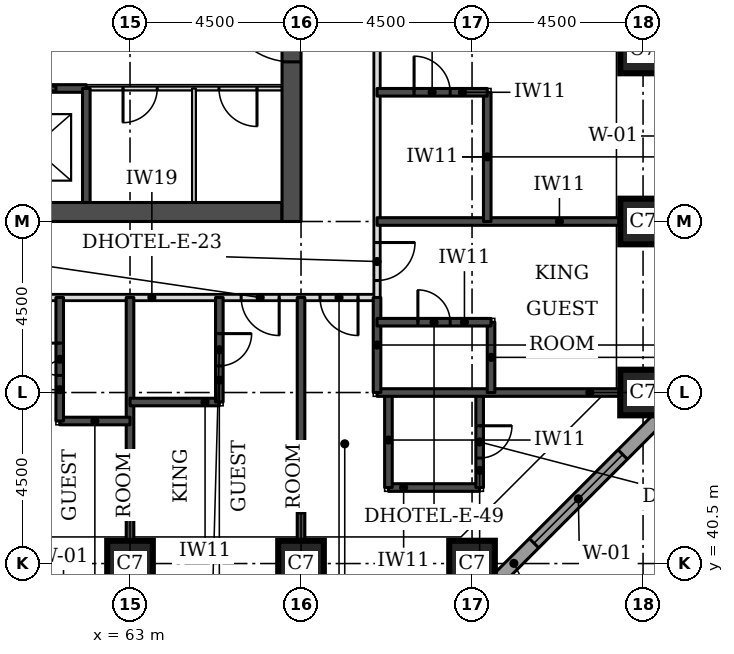
"""IFC4 building model, lengths in metres.
Left out: names, types, materials, properties, quantities, classifications, styles, units other than length and angle.
Written with IfcOpenShell. Run it as: python <this file> out.ifc"""

import sys

from ifc_helpers import new_model, si_unit, direction, frame, frame_2d, origin, origin_2d, place, context, subcontext, project, spatial, rectangle, extrude, element, fill, save


model = new_model("IFC4")
c1 = context("Model", 3, precision=1e-05, world=origin(), true_north=direction((0.0, 1.0)))
c2 = subcontext(c1, "Body", "Model", "MODEL_VIEW")
j1 = project(units=[si_unit("LENGTHUNIT", "METRE"), si_unit("PLANEANGLEUNIT", "RADIAN")], contexts=[c1])
p1 = place(None, origin())
s1 = spatial("IfcSite", under=j1, at=p1, CompositionType="ELEMENT")
p2 = place(p1, origin())
s2 = spatial("IfcBuilding", under=s1, at=p2, CompositionType="ELEMENT")
p3 = place(p2, frame((0.0, 0.0, 62.7)))
s3 = spatial("IfcBuildingStorey", under=s2, at=p3, CompositionType="ELEMENT", Elevation=62.7)
for number, where, z_axis, x_axis in (
    (1, (63.0, 40.5, 0.0), (0.0, 0.0, 1.0), (1.0, 0.0, 0.0)),
    (2, (67.5, 40.5, 0.0), (0.0, 0.0, 1.0), (1.0, 0.0, 0.0)),
    (3, (72.0, 40.5, 0.0), (0.0, 0.0, 1.0), (1.0, 0.0, 0.0)),
    (4, (76.5, 45.0, 0.0), (0.0, 0.0, 1.0), (1.0, 0.0, 0.0)),
    (5, (76.5, 49.5, 0.0), (0.0, 0.0, 1.0), (1.0, 0.0, 0.0)),
    (6, (76.5, 54.0, 0.0), (0.0, 0.0, 1.0), (1.0, 0.0, 0.0)),
):
    element("IfcColumn", number, at=place(p3, frame(where, z_axis=z_axis, x_axis=x_axis)), inside=s3, PredefinedType="COLUMN", context=c2, shape_type="SweptSolid", body=[
        extrude(rectangle(XDim=1.2, YDim=1.2, at=origin_2d()), origin(), (0.0, 0.0, 1.0), 3.3),
    ])
p4 = place(p3, frame((45.5, 49.75, 0.0), z_axis=(0.0, 0.0, 1.0), x_axis=(1.0, 0.0, 0.0)))
e7 = element("IfcWall", 7, at=p4, inside=s3, PredefinedType="SHEAR", context=c2, shape_type="SweptSolid", body=[
    extrude(rectangle(XDim=21.5, YDim=0.5, at=frame_2d((10.75, 0.0))), origin(), (0.0, 0.0, 1.0), 3.3),
])
p5 = place(p3, frame((67.25, 49.5, 0.0), z_axis=(0.0, 0.0, 1.0), x_axis=(0.0, 1.0, 0.0)))
e8 = element("IfcWall", 8, at=p5, inside=s3, PredefinedType="SHEAR", context=c2, shape_type="SweptSolid", body=[
    extrude(rectangle(XDim=22.5, YDim=0.5, at=frame_2d((11.25, 0.0))), origin(), (0.0, 0.0, 1.0), 3.3),
])
p6 = place(p5, frame((4.2, 0.0, 0.0)))
e9 = element("IfcOpeningElement", 9, at=p6, cuts=e8, PredefinedType="OPENING", context=c2, shape_type="SweptSolid", body=[
    extrude(rectangle(XDim=1.8, YDim=2.1, at=frame_2d((0.9, 1.05))), frame((0.0, 0.26, 0.0), z_axis=(0.0, -1.0, 0.0), x_axis=(1.0, 0.0, 0.0)), (0.0, 0.0, 1.0), 0.52),
])
p7 = place(p5, frame((6.9, 0.0, 0.0)))
e10 = element("IfcOpeningElement", 10, at=p7, cuts=e8, PredefinedType="OPENING", context=c2, shape_type="SweptSolid", body=[
    extrude(rectangle(XDim=1.1, YDim=2.1, at=frame_2d((0.55, 1.05))), frame((0.0, 0.26, 0.0), z_axis=(0.0, -1.0, 0.0), x_axis=(1.0, 0.0, 0.0)), (0.0, 0.0, 1.0), 0.52),
])
p8 = place(p5, frame((13.6, 0.0, 0.0)))
e11 = element("IfcOpeningElement", 11, at=p8, cuts=e8, PredefinedType="OPENING", context=c2, shape_type="SweptSolid", body=[
    extrude(rectangle(XDim=1.1, YDim=2.1, at=frame_2d((0.55, 1.05))), frame((0.0, 0.26, 0.0), z_axis=(0.0, -1.0, 0.0), x_axis=(1.0, 0.0, 0.0)), (0.0, 0.0, 1.0), 0.52),
])
p9 = place(p5, frame((16.5, 0.0, 0.0)))
e12 = element("IfcOpeningElement", 12, at=p9, cuts=e8, PredefinedType="OPENING", context=c2, shape_type="SweptSolid", body=[
    extrude(rectangle(XDim=1.8, YDim=2.1, at=frame_2d((0.9, 1.05))), frame((0.0, 0.26, 0.0), z_axis=(0.0, -1.0, 0.0), x_axis=(1.0, 0.0, 0.0)), (0.0, 0.0, 1.0), 0.52),
])
p10 = place(p3, frame((72.27, 39.674, 0.0), z_axis=(0.0, 0.0, 1.0), x_axis=(0.707106781187, 0.707106781187, 0.0)))
e13 = element("IfcWall", 13, at=p10, inside=s3, PredefinedType="STANDARD", context=c2, shape_type="SweptSolid", body=[
    extrude(rectangle(XDim=7.151, YDim=0.35, at=frame_2d((3.576, 0.0))), origin(), (0.0, 0.0, 1.0), 3.055),
])
p11 = place(p10, frame((1.926, 0.0, 0.8)))
e14 = element("IfcOpeningElement", 14, at=p11, cuts=e13, PredefinedType="OPENING", context=c2, shape_type="SweptSolid", body=[
    extrude(rectangle(XDim=3.3, YDim=1.5, at=frame_2d((1.65, 0.75))), frame((0.0, 0.185, 0.0), z_axis=(0.0, -1.0, 0.0), x_axis=(1.0, 0.0, 0.0)), (0.0, 0.0, 1.0), 0.37),
])
p12 = place(p3, frame((52.85, 47.5, 0.0), z_axis=(0.0, 0.0, 1.0), x_axis=(1.0, 0.0, 0.0)))
e15 = element("IfcWall", 15, at=p12, inside=s3, PredefinedType="PARTITIONING", context=c2, shape_type="SweptSolid", body=[
    extrude(rectangle(XDim=16.65, YDim=0.15, at=frame_2d((8.325, 0.0))), origin(), (0.0, 0.0, 1.0), 3.08),
])
p13 = place(p12, frame((13.075, 0.0, 0.0)))
e16 = element("IfcOpeningElement", 16, at=p13, cuts=e15, PredefinedType="OPENING", context=c2, shape_type="SweptSolid", body=[
    extrude(rectangle(XDim=1.0, YDim=2.1, at=frame_2d((0.5, 1.05))), frame((0.0, 0.085, 0.0), z_axis=(0.0, -1.0, 0.0), x_axis=(1.0, 0.0, 0.0)), (0.0, 0.0, 1.0), 0.17),
])
p14 = place(p12, frame((6.475, 0.0, 0.0)))
e17 = element("IfcOpeningElement", 17, at=p14, cuts=e15, PredefinedType="OPENING", context=c2, shape_type="SweptSolid", body=[
    extrude(rectangle(XDim=1.0, YDim=2.1, at=frame_2d((0.5, 1.05))), frame((0.0, 0.085, 0.0), z_axis=(0.0, -1.0, 0.0), x_axis=(1.0, 0.0, 0.0)), (0.0, 0.0, 1.0), 0.17),
])
p15 = place(p12, frame((15.15, 0.0, 0.0)))
e18 = element("IfcOpeningElement", 18, at=p15, cuts=e15, PredefinedType="OPENING", context=c2, shape_type="SweptSolid", body=[
    extrude(rectangle(XDim=1.0, YDim=2.1, at=frame_2d((0.5, 1.05))), frame((0.0, 0.085, 0.0), z_axis=(0.0, -1.0, 0.0), x_axis=(1.0, 0.0, 0.0)), (0.0, 0.0, 1.0), 0.17),
])
p16 = place(p3, frame((69.5, 47.5, 0.0), z_axis=(0.0, 0.0, 1.0), x_axis=(0.0, 1.0, 0.0)))
e19 = element("IfcWall", 19, at=p16, inside=s3, PredefinedType="PARTITIONING", context=c2, shape_type="SweptSolid", body=[
    extrude(rectangle(XDim=26.5, YDim=0.15, at=frame_2d((13.25, 0.0))), origin(), (0.0, 0.0, 1.0), 3.08),
])
p17 = place(p16, frame((25.053, 0.0, 0.0)))
e20 = element("IfcOpeningElement", 20, at=p17, cuts=e19, PredefinedType="OPENING", context=c2, shape_type="SweptSolid", body=[
    extrude(rectangle(XDim=1.0, YDim=2.1, at=frame_2d((0.5, 1.05))), frame((0.0, 0.085, 0.0), z_axis=(0.0, -1.0, 0.0), x_axis=(1.0, 0.0, 0.0)), (0.0, 0.0, 1.0), 0.17),
])
p18 = place(p16, frame((13.775, 0.0, 0.0)))
e21 = element("IfcOpeningElement", 21, at=p18, cuts=e19, PredefinedType="OPENING", context=c2, shape_type="SweptSolid", body=[
    extrude(rectangle(XDim=1.0, YDim=2.1, at=frame_2d((0.5, 1.05))), frame((0.0, 0.085, 0.0), z_axis=(0.0, -1.0, 0.0), x_axis=(1.0, 0.0, 0.0)), (0.0, 0.0, 1.0), 0.17),
])
p19 = place(p16, frame((7.65, 0.0, 0.0)))
e22 = element("IfcOpeningElement", 22, at=p19, cuts=e19, PredefinedType="OPENING", context=c2, shape_type="SweptSolid", body=[
    extrude(rectangle(XDim=1.1, YDim=2.1, at=frame_2d((0.55, 1.05))), frame((0.0, 0.085, 0.0), z_axis=(0.0, -1.0, 0.0), x_axis=(1.0, 0.0, 0.0)), (0.0, 0.0, 1.0), 0.17),
])
p20 = place(p16, frame((0.447, 0.0, 0.0)))
e23 = element("IfcOpeningElement", 23, at=p20, cuts=e19, PredefinedType="OPENING", context=c2, shape_type="SweptSolid", body=[
    extrude(rectangle(XDim=1.0, YDim=2.1, at=frame_2d((0.5, 1.05))), frame((0.0, 0.085, 0.0), z_axis=(0.0, -1.0, 0.0), x_axis=(1.0, 0.0, 0.0)), (0.0, 0.0, 1.0), 0.17),
])
for number, where, z_axis, x_axis in (
    (24, (63.0, 41.1, 0.0), (0.0, 0.0, 1.0), (0.0, 1.0, 0.0)),
    (25, (67.5, 41.1, 0.0), (0.0, 0.0, 1.0), (0.0, 1.0, 0.0)),
):
    element("IfcWall", number, at=place(p3, frame(where, z_axis=z_axis, x_axis=x_axis)), inside=s3, PredefinedType="SOLIDWALL", context=c2, shape_type="SweptSolid", body=[
        extrude(rectangle(XDim=6.4, YDim=0.2, at=frame_2d((3.2, 0.0))), origin(), (0.0, 0.0, 1.0), 3.08),
    ])
p21 = place(p3, frame((69.8, 42.5, 0.0), z_axis=(0.0, 0.0, 1.0), x_axis=(1.0, 0.0, 0.0)))
e26 = element("IfcWall", 26, at=p21, inside=s3, PredefinedType="SOLIDWALL", context=c2, shape_type="SweptSolid", body=[
    extrude(rectangle(XDim=2.4, YDim=0.2, at=frame_2d((1.2, 0.0))), origin(), (0.0, 0.0, 1.0), 3.08),
])
p22 = place(p3, frame((69.8, 42.5, 0.0), z_axis=(0.0, 0.0, 1.0), x_axis=(0.0, 1.0, 0.0)))
e27 = element("IfcWall", 27, at=p22, inside=s3, PredefinedType="SOLIDWALL", context=c2, shape_type="SweptSolid", body=[
    extrude(rectangle(XDim=2.5, YDim=0.2, at=frame_2d((1.25, 0.0))), origin(), (0.0, 0.0, 1.0), 3.08),
])
p23 = place(p3, frame((72.2, 42.5, 0.0), z_axis=(0.0, 0.0, 1.0), x_axis=(0.0, 1.0, 0.0)))
e28 = element("IfcWall", 28, at=p23, inside=s3, PredefinedType="SOLIDWALL", context=c2, shape_type="SweptSolid", body=[
    extrude(rectangle(XDim=2.5, YDim=0.2, at=frame_2d((1.25, 0.0))), origin(), (0.0, 0.0, 1.0), 3.08),
])
p24 = place(p23, frame((0.775, 0.0, 0.0)))
e29 = element("IfcOpeningElement", 29, at=p24, cuts=e28, PredefinedType="OPENING", context=c2, shape_type="SweptSolid", body=[
    extrude(rectangle(XDim=0.85, YDim=2.1, at=frame_2d((0.425, 1.05))), frame((0.0, 0.11, 0.0), z_axis=(0.0, -1.0, 0.0), x_axis=(1.0, 0.0, 0.0)), (0.0, 0.0, 1.0), 0.22),
])
p25 = place(p3, frame((61.15, 44.25, 0.0), z_axis=(0.0, 0.0, 1.0), x_axis=(1.0, 0.0, 0.0)))
e30 = element("IfcWall", 30, at=p25, inside=s3, PredefinedType="SOLIDWALL", context=c2, shape_type="SweptSolid", body=[
    extrude(rectangle(XDim=1.85, YDim=0.2, at=frame_2d((0.925, 0.0))), origin(), (0.0, 0.0, 1.0), 3.08),
])
p26 = place(p3, frame((61.15, 44.25, 0.0), z_axis=(0.0, 0.0, 1.0), x_axis=(0.0, 1.0, 0.0)))
e31 = element("IfcWall", 31, at=p26, inside=s3, PredefinedType="SOLIDWALL", context=c2, shape_type="SweptSolid", body=[
    extrude(rectangle(XDim=3.25, YDim=0.2, at=frame_2d((1.625, 0.0))), origin(), (0.0, 0.0, 1.0), 3.08),
])
p27 = place(p26, frame((1.2, 0.0, 0.0)))
e32 = element("IfcOpeningElement", 32, at=p27, cuts=e31, PredefinedType="OPENING", context=c2, shape_type="SweptSolid", body=[
    extrude(rectangle(XDim=0.85, YDim=2.1, at=frame_2d((0.425, 1.05))), frame((0.0, 0.11, 0.0), z_axis=(0.0, -1.0, 0.0), x_axis=(1.0, 0.0, 0.0)), (0.0, 0.0, 1.0), 0.22),
])
p28 = place(p3, frame((63.0, 44.75, 0.0), z_axis=(0.0, 0.0, 1.0), x_axis=(1.0, 0.0, 0.0)))
e33 = element("IfcWall", 33, at=p28, inside=s3, PredefinedType="SOLIDWALL", context=c2, shape_type="SweptSolid", body=[
    extrude(rectangle(XDim=2.35, YDim=0.2, at=frame_2d((1.175, 0.0))), origin(), (0.0, 0.0, 1.0), 3.08),
])
p29 = place(p3, frame((65.35, 44.75, 0.0), z_axis=(0.0, 0.0, 1.0), x_axis=(0.0, 1.0, 0.0)))
e34 = element("IfcWall", 34, at=p29, inside=s3, PredefinedType="SOLIDWALL", context=c2, shape_type="SweptSolid", body=[
    extrude(rectangle(XDim=2.75, YDim=0.2, at=frame_2d((1.375, 0.0))), origin(), (0.0, 0.0, 1.0), 3.08),
])
p30 = place(p29, frame((0.95, 0.0, 0.0)))
e35 = element("IfcOpeningElement", 35, at=p30, cuts=e34, PredefinedType="OPENING", context=c2, shape_type="SweptSolid", body=[
    extrude(rectangle(XDim=0.85, YDim=2.1, at=frame_2d((0.425, 1.05))), frame((0.0, 0.11, 0.0), z_axis=(0.0, -1.0, 0.0), x_axis=(1.0, 0.0, 0.0)), (0.0, 0.0, 1.0), 0.22),
])
p31 = place(p3, frame((69.5, 45.0, 0.0), z_axis=(0.0, 0.0, 1.0), x_axis=(1.0, 0.0, 0.0)))
e36 = element("IfcWall", 36, at=p31, inside=s3, PredefinedType="SOLIDWALL", context=c2, shape_type="SweptSolid", body=[
    extrude(rectangle(XDim=6.4, YDim=0.2, at=frame_2d((3.2, 0.0))), origin(), (0.0, 0.0, 1.0), 3.08),
])
p32 = place(p3, frame((69.5, 45.0, 0.0), z_axis=(0.0, 0.0, 1.0), x_axis=(0.0, 1.0, 0.0)))
e37 = element("IfcWall", 37, at=p32, inside=s3, PredefinedType="SOLIDWALL", context=c2, shape_type="SweptSolid", body=[
    extrude(rectangle(XDim=2.5, YDim=0.2, at=frame_2d((1.25, 0.0))), origin(), (0.0, 0.0, 1.0), 3.08),
])
p33 = place(p3, frame((72.5, 45.0, 0.0), z_axis=(0.0, 0.0, 1.0), x_axis=(0.0, 1.0, 0.0)))
e38 = element("IfcWall", 38, at=p33, inside=s3, PredefinedType="SOLIDWALL", context=c2, shape_type="SweptSolid", body=[
    extrude(rectangle(XDim=1.85, YDim=0.2, at=frame_2d((0.925, 0.0))), origin(), (0.0, 0.0, 1.0), 3.08),
])
p34 = place(p3, frame((69.5, 46.85, 0.0), z_axis=(0.0, 0.0, 1.0), x_axis=(1.0, 0.0, 0.0)))
e39 = element("IfcWall", 39, at=p34, inside=s3, PredefinedType="SOLIDWALL", context=c2, shape_type="SweptSolid", body=[
    extrude(rectangle(XDim=3.0, YDim=0.2, at=frame_2d((1.5, 0.0))), origin(), (0.0, 0.0, 1.0), 3.08),
])
p35 = place(p34, frame((1.075, 0.0, 0.0)))
e40 = element("IfcOpeningElement", 40, at=p35, cuts=e39, PredefinedType="OPENING", context=c2, shape_type="SweptSolid", body=[
    extrude(rectangle(XDim=0.85, YDim=2.1, at=frame_2d((0.425, 1.05))), frame((0.0, 0.11, 0.0), z_axis=(0.0, -1.0, 0.0), x_axis=(1.0, 0.0, 0.0)), (0.0, 0.0, 1.0), 0.22),
])
p36 = place(p3, frame((69.5, 49.5, 0.0), z_axis=(0.0, 0.0, 1.0), x_axis=(1.0, 0.0, 0.0)))
e41 = element("IfcWall", 41, at=p36, inside=s3, PredefinedType="SOLIDWALL", context=c2, shape_type="SweptSolid", body=[
    extrude(rectangle(XDim=6.4, YDim=0.2, at=frame_2d((3.2, 0.0))), origin(), (0.0, 0.0, 1.0), 3.08),
])
p37 = place(p3, frame((72.4, 49.5, 0.0), z_axis=(0.0, 0.0, 1.0), x_axis=(0.0, 1.0, 0.0)))
e42 = element("IfcWall", 42, at=p37, inside=s3, PredefinedType="SOLIDWALL", context=c2, shape_type="SweptSolid", body=[
    extrude(rectangle(XDim=3.4, YDim=0.2, at=frame_2d((1.7, 0.0))), origin(), (0.0, 0.0, 1.0), 3.08),
])
p38 = place(p3, frame((69.5, 52.9, 0.0), z_axis=(0.0, 0.0, 1.0), x_axis=(1.0, 0.0, 0.0)))
e43 = element("IfcWall", 43, at=p38, inside=s3, PredefinedType="SOLIDWALL", context=c2, shape_type="SweptSolid", body=[
    extrude(rectangle(XDim=2.9, YDim=0.2, at=frame_2d((1.45, 0.0))), origin(), (0.0, 0.0, 1.0), 3.08),
])
p39 = place(p38, frame((0.975, 0.0, 0.0)))
e44 = element("IfcOpeningElement", 44, at=p39, cuts=e43, PredefinedType="OPENING", context=c2, shape_type="SweptSolid", body=[
    extrude(rectangle(XDim=0.95, YDim=2.1, at=frame_2d((0.475, 1.05))), frame((0.0, 0.11, 0.0), z_axis=(0.0, -1.0, 0.0), x_axis=(1.0, 0.0, 0.0)), (0.0, 0.0, 1.0), 0.22),
])
p40 = place(p3, frame((61.85, 53.0, 0.0), z_axis=(0.0, 0.0, 1.0), x_axis=(1.0, 0.0, 0.0)))
e45 = element("IfcWall", 45, at=p40, inside=s3, PredefinedType="PARTITIONING", context=c2, shape_type="SweptSolid", body=[
    extrude(rectangle(XDim=5.15, YDim=0.1, at=frame_2d((2.575, 0.0))), origin(), (0.0, 0.0, 1.0), 3.08),
])
p41 = place(p40, frame((3.491, 0.0, 0.0)))
e46 = element("IfcOpeningElement", 46, at=p41, cuts=e45, PredefinedType="OPENING", context=c2, shape_type="SweptSolid", body=[
    extrude(rectangle(XDim=1.0, YDim=2.1, at=frame_2d((0.5, 1.05))), frame((0.0, 0.06, 0.0), z_axis=(0.0, -1.0, 0.0), x_axis=(1.0, 0.0, 0.0)), (0.0, 0.0, 1.0), 0.12),
])
p42 = place(p40, frame((0.966, 0.0, 0.0)))
e47 = element("IfcOpeningElement", 47, at=p42, cuts=e45, PredefinedType="OPENING", context=c2, shape_type="SweptSolid", body=[
    extrude(rectangle(XDim=0.9, YDim=2.1, at=frame_2d((0.45, 1.05))), frame((0.0, 0.06, 0.0), z_axis=(0.0, -1.0, 0.0), x_axis=(1.0, 0.0, 0.0)), (0.0, 0.0, 1.0), 0.12),
])
p43 = place(p3, frame((50.65, 53.0, 0.0), z_axis=(0.0, 0.0, 1.0), x_axis=(1.0, 0.0, 0.0)))
e48 = element("IfcWall", 48, at=p43, inside=s3, PredefinedType="SOLIDWALL", context=c2, shape_type="SweptSolid", body=[
    extrude(rectangle(XDim=11.2, YDim=0.2, at=frame_2d((5.6, 0.0))), origin(), (0.0, 0.0, 1.0), 3.08),
])
p44 = place(p43, frame((0.8, 0.0, 0.0)))
e49 = element("IfcOpeningElement", 49, at=p44, cuts=e48, PredefinedType="OPENING", context=c2, shape_type="SweptSolid", body=[
    extrude(rectangle(XDim=1.2, YDim=2.1, at=frame_2d((0.6, 1.05))), frame((0.0, 0.11, 0.0), z_axis=(0.0, -1.0, 0.0), x_axis=(1.0, 0.0, 0.0)), (0.0, 0.0, 1.0), 0.22),
])
p45 = place(p43, frame((3.6, 0.0, 0.0)))
e50 = element("IfcOpeningElement", 50, at=p45, cuts=e48, PredefinedType="OPENING", context=c2, shape_type="SweptSolid", body=[
    extrude(rectangle(XDim=1.2, YDim=2.1, at=frame_2d((0.6, 1.05))), frame((0.0, 0.11, 0.0), z_axis=(0.0, -1.0, 0.0), x_axis=(1.0, 0.0, 0.0)), (0.0, 0.0, 1.0), 0.22),
])
p46 = place(p43, frame((6.4, 0.0, 0.0)))
e51 = element("IfcOpeningElement", 51, at=p46, cuts=e48, PredefinedType="OPENING", context=c2, shape_type="SweptSolid", body=[
    extrude(rectangle(XDim=1.2, YDim=2.1, at=frame_2d((0.6, 1.05))), frame((0.0, 0.11, 0.0), z_axis=(0.0, -1.0, 0.0), x_axis=(1.0, 0.0, 0.0)), (0.0, 0.0, 1.0), 0.22),
])
p47 = place(p43, frame((9.2, 0.0, 0.0)))
e52 = element("IfcOpeningElement", 52, at=p47, cuts=e48, PredefinedType="OPENING", context=c2, shape_type="SweptSolid", body=[
    extrude(rectangle(XDim=1.2, YDim=2.1, at=frame_2d((0.6, 1.05))), frame((0.0, 0.11, 0.0), z_axis=(0.0, -1.0, 0.0), x_axis=(1.0, 0.0, 0.0)), (0.0, 0.0, 1.0), 0.22),
])
p48 = place(p3, frame((61.85, 50.0, 0.0), z_axis=(0.0, 0.0, 1.0), x_axis=(0.0, 1.0, 0.0)))
e53 = element("IfcWall", 53, at=p48, inside=s3, PredefinedType="SOLIDWALL", context=c2, shape_type="SweptSolid", body=[
    extrude(rectangle(XDim=3.0, YDim=0.2, at=frame_2d((1.5, 0.0))), origin(), (0.0, 0.0, 1.0), 3.08),
])
p49 = place(p3, frame((64.683, 50.0, 0.0), z_axis=(0.0, 0.0, 1.0), x_axis=(0.0, 1.0, 0.0)))
e54 = element("IfcWall", 54, at=p49, inside=s3, PredefinedType="PARTITIONING", context=c2, shape_type="SweptSolid", body=[
    extrude(rectangle(XDim=3.0, YDim=0.1, at=frame_2d((1.5, 0.0))), origin(), (0.0, 0.0, 1.0), 3.08),
])
p50 = place(p11, origin())
e55 = element("IfcWindow", 55, at=p50, inside=s3, PartitioningType="SINGLE_PANEL", PredefinedType="WINDOW", context=c2, shape_type="SweptSolid", body=[
    extrude(rectangle(XDim=3.3, YDim=1.5, at=frame_2d((1.65, 0.75))), frame((0.0, 0.085, 0.0), z_axis=(0.0, -1.0, 0.0), x_axis=(1.0, 0.0, 0.0)), (0.0, 0.0, 1.0), 0.06),
])
fill(e14, e55)
p51 = place(p39, origin())
e56 = element("IfcDoor", 56, at=p51, inside=s3, OperationType="SINGLE_SWING_LEFT", PredefinedType="DOOR", context=c2, shape_type="SweptSolid", body=[
    extrude(rectangle(XDim=0.95, YDim=2.1, at=frame_2d((0.475, 1.05))), frame((0.0, 0.025, 0.0), z_axis=(0.0, -1.0, 0.0), x_axis=(1.0, 0.0, 0.0)), (0.0, 0.0, 1.0), 0.05),
])
fill(e44, e56)
p52 = place(p20, frame((1.0, 0.0, 0.0), z_axis=(0.0, 0.0, 1.0), x_axis=(-1.0, 0.0, 0.0)))
e57 = element("IfcDoor", 57, at=p52, inside=s3, OperationType="SINGLE_SWING_LEFT", PredefinedType="DOOR", context=c2, shape_type="SweptSolid", body=[
    extrude(rectangle(XDim=1.0, YDim=2.1, at=frame_2d((0.5, 1.05))), frame((0.0, 0.025, 0.0), z_axis=(0.0, -1.0, 0.0), x_axis=(1.0, 0.0, 0.0)), (0.0, 0.0, 1.0), 0.05),
])
fill(e23, e57)
p53 = place(p35, origin())
e58 = element("IfcDoor", 58, at=p53, inside=s3, OperationType="SINGLE_SWING_LEFT", PredefinedType="DOOR", context=c2, shape_type="SweptSolid", body=[
    extrude(rectangle(XDim=0.85, YDim=2.1, at=frame_2d((0.425, 1.05))), frame((0.0, 0.025, 0.0), z_axis=(0.0, -1.0, 0.0), x_axis=(1.0, 0.0, 0.0)), (0.0, 0.0, 1.0), 0.05),
])
fill(e40, e58)
p54 = place(p13, frame((1.0, 0.0, 0.0), z_axis=(0.0, 0.0, 1.0), x_axis=(-1.0, 0.0, 0.0)))
e59 = element("IfcDoor", 59, at=p54, inside=s3, OperationType="SINGLE_SWING_LEFT", PredefinedType="DOOR", context=c2, shape_type="SweptSolid", body=[
    extrude(rectangle(XDim=1.0, YDim=2.1, at=frame_2d((0.5, 1.05))), frame((0.0, 0.025, 0.0), z_axis=(0.0, -1.0, 0.0), x_axis=(1.0, 0.0, 0.0)), (0.0, 0.0, 1.0), 0.05),
])
fill(e16, e59)
p55 = place(p30, frame((0.85, 0.0, 0.0), z_axis=(0.0, 0.0, 1.0), x_axis=(-1.0, 0.0, 0.0)))
e60 = element("IfcDoor", 60, at=p55, inside=s3, OperationType="SINGLE_SWING_LEFT", PredefinedType="DOOR", context=c2, shape_type="SweptSolid", body=[
    extrude(rectangle(XDim=0.85, YDim=2.1, at=frame_2d((0.425, 1.05))), frame((0.0, 0.025, 0.0), z_axis=(0.0, -1.0, 0.0), x_axis=(1.0, 0.0, 0.0)), (0.0, 0.0, 1.0), 0.05),
])
fill(e35, e60)
p56 = place(p27, origin())
e61 = element("IfcDoor", 61, at=p56, inside=s3, OperationType="SINGLE_SWING_RIGHT", PredefinedType="DOOR", context=c2, shape_type="SweptSolid", body=[
    extrude(rectangle(XDim=0.85, YDim=2.1, at=frame_2d((0.425, 1.05))), frame((0.0, 0.025, 0.0), z_axis=(0.0, -1.0, 0.0), x_axis=(1.0, 0.0, 0.0)), (0.0, 0.0, 1.0), 0.05),
])
fill(e32, e61)
p57 = place(p15, frame((1.0, 0.0, 0.0), z_axis=(0.0, 0.0, 1.0), x_axis=(-1.0, 0.0, 0.0)))
e62 = element("IfcDoor", 62, at=p57, inside=s3, OperationType="SINGLE_SWING_LEFT", PredefinedType="DOOR", context=c2, shape_type="SweptSolid", body=[
    extrude(rectangle(XDim=1.0, YDim=2.1, at=frame_2d((0.5, 1.05))), frame((0.0, 0.025, 0.0), z_axis=(0.0, -1.0, 0.0), x_axis=(1.0, 0.0, 0.0)), (0.0, 0.0, 1.0), 0.05),
])
fill(e18, e62)
p58 = place(p24, frame((0.85, 0.0, 0.0), z_axis=(0.0, 0.0, 1.0), x_axis=(-1.0, 0.0, 0.0)))
e63 = element("IfcDoor", 63, at=p58, inside=s3, OperationType="SINGLE_SWING_LEFT", PredefinedType="DOOR", context=c2, shape_type="SweptSolid", body=[
    extrude(rectangle(XDim=0.85, YDim=2.1, at=frame_2d((0.425, 1.05))), frame((0.0, 0.025, 0.0), z_axis=(0.0, -1.0, 0.0), x_axis=(1.0, 0.0, 0.0)), (0.0, 0.0, 1.0), 0.05),
])
fill(e29, e63)
p59 = place(p47, origin())
e64 = element("IfcDoor", 64, at=p59, inside=s3, OperationType="DOUBLE_DOOR_SLIDING", PredefinedType="DOOR", context=c2, shape_type="SweptSolid", body=[
    extrude(rectangle(XDim=1.2, YDim=2.1, at=frame_2d((0.6, 1.05))), frame((0.0, 0.025, 0.0), z_axis=(0.0, -1.0, 0.0), x_axis=(1.0, 0.0, 0.0)), (0.0, 0.0, 1.0), 0.05),
])
fill(e52, e64)
p60 = place(p6, origin())
e65 = element("IfcDoor", 65, at=p60, inside=s3, OperationType="SINGLE_SWING_RIGHT", PredefinedType="DOOR", context=c2, shape_type="SweptSolid", body=[
    extrude(rectangle(XDim=1.8, YDim=2.1, at=frame_2d((0.9, 1.05))), frame((0.0, 0.025, 0.0), z_axis=(0.0, -1.0, 0.0), x_axis=(1.0, 0.0, 0.0)), (0.0, 0.0, 1.0), 0.05),
])
fill(e9, e65)
p61 = place(p41, frame((1.0, 0.0, 0.0), z_axis=(0.0, 0.0, 1.0), x_axis=(-1.0, 0.0, 0.0)))
e66 = element("IfcDoor", 66, at=p61, inside=s3, OperationType="SINGLE_SWING_LEFT", PredefinedType="DOOR", context=c2, shape_type="SweptSolid", body=[
    extrude(rectangle(XDim=1.0, YDim=2.1, at=frame_2d((0.5, 1.05))), frame((0.0, 0.025, 0.0), z_axis=(0.0, -1.0, 0.0), x_axis=(1.0, 0.0, 0.0)), (0.0, 0.0, 1.0), 0.05),
])
fill(e46, e66)
p62 = place(p42, frame((0.9, 0.0, 0.0), z_axis=(0.0, 0.0, 1.0), x_axis=(-1.0, 0.0, 0.0)))
e67 = element("IfcDoor", 67, at=p62, inside=s3, OperationType="SINGLE_SWING_RIGHT", PredefinedType="DOOR", context=c2, shape_type="SweptSolid", body=[
    extrude(rectangle(XDim=0.9, YDim=2.1, at=frame_2d((0.45, 1.05))), frame((0.0, 0.025, 0.0), z_axis=(0.0, -1.0, 0.0), x_axis=(1.0, 0.0, 0.0)), (0.0, 0.0, 1.0), 0.05),
])
fill(e47, e67)
save(model, sys.argv[1])
